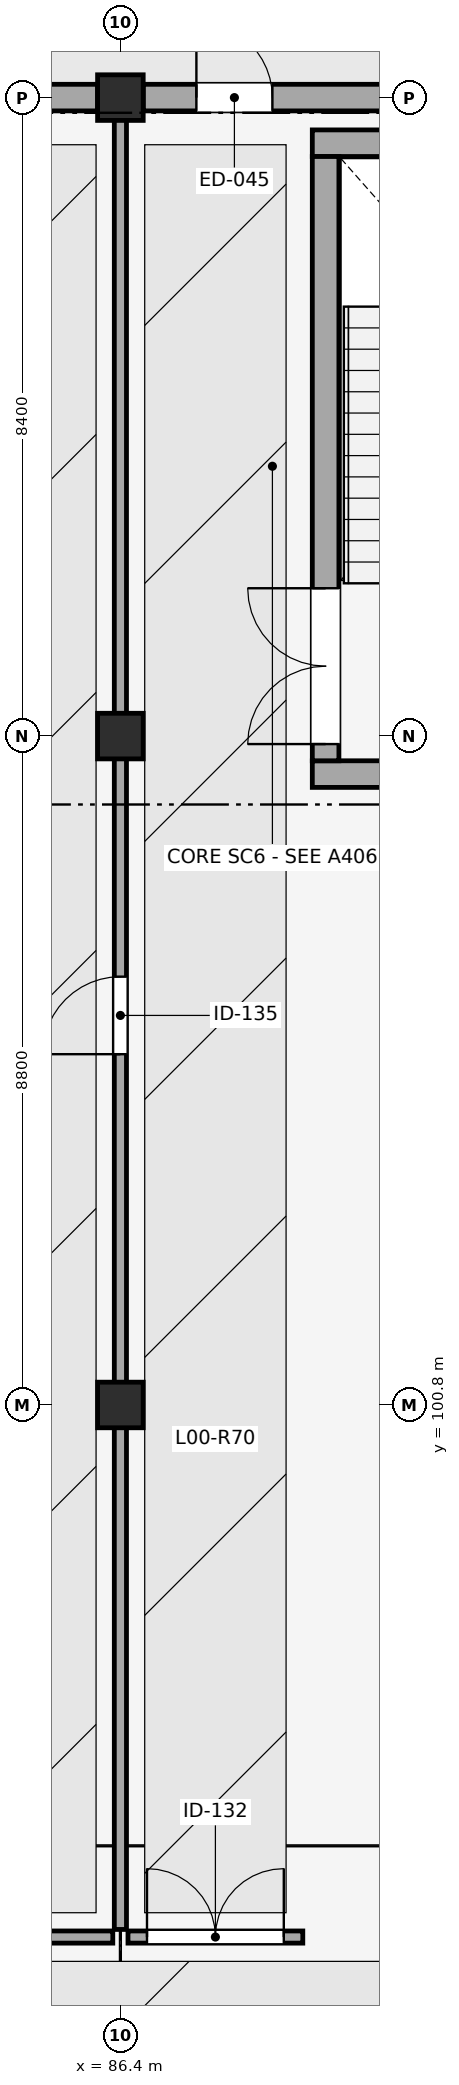
"""IFC4 building model, lengths in metres.
Left out: names, types, materials, properties, quantities, classifications, styles, units other than length and angle.
Written with IfcOpenShell. Run it as: python <this file> out.ifc"""

import sys

from ifc_helpers import new_model, si_unit, direction, frame, frame_2d, origin, origin_2d, place, context, subcontext, project, spatial, rectangle, extrude, element, fill, save


model = new_model("IFC4")
c1 = context("Model", 3, precision=1e-05, world=origin(), true_north=direction((0.0, 1.0)))
c2 = subcontext(c1, "Body", "Model", "MODEL_VIEW")
j1 = project(units=[si_unit("LENGTHUNIT", "METRE"), si_unit("PLANEANGLEUNIT", "RADIAN")], contexts=[c1])
p1 = place(None, origin())
s1 = spatial("IfcSite", under=j1, at=p1, CompositionType="ELEMENT")
p2 = place(p1, origin())
s2 = spatial("IfcBuilding", under=s1, at=p2, CompositionType="ELEMENT")
p3 = place(p2, origin())
s3 = spatial("IfcBuildingStorey", under=s2, at=p3, CompositionType="ELEMENT", Elevation=0.0)
for number, where, z_axis, x_axis in (
    (1, (86.4, 100.8, 0.0), (0.0, 0.0, 1.0), (1.0, 0.0, 0.0)),
    (2, (86.4, 109.6, 0.0), (0.0, 0.0, 1.0), (1.0, 0.0, 0.0)),
    (3, (86.4, 118.0, 0.0), (0.0, 0.0, 1.0), (1.0, 0.0, 0.0)),
):
    element("IfcColumn", number, at=place(p3, frame(where, z_axis=z_axis, x_axis=x_axis)), inside=s3, PredefinedType="COLUMN", context=c2, shape_type="SweptSolid", body=[
        extrude(rectangle(XDim=0.6, YDim=0.6, at=origin_2d()), origin(), (0.0, 0.0, 1.0), 4.8),
    ])
p4 = place(p3, frame((77.1, 118.0, 0.0), z_axis=(0.0, 0.0, 1.0), x_axis=(1.0, 0.0, 0.0)))
e4 = element("IfcWall", 4, at=p4, inside=s3, PredefinedType="SOLIDWALL", context=c2, shape_type="SweptSolid", body=[
    extrude(rectangle(XDim=9.0, YDim=0.35, at=frame_2d((4.5, 0.0))), origin(), (0.0, 0.0, 1.0), 4.1),
])
p5 = place(p4, frame((5.4, 0.0, 1.1)))
e5 = element("IfcOpeningElement", 5, at=p5, cuts=e4, PredefinedType="OPENING", context=c2, shape_type="SweptSolid", body=[
    extrude(rectangle(XDim=1.42, YDim=1.54, at=frame_2d((0.71, 0.77))), frame((0.0, 0.185, 0.0), z_axis=(0.0, -1.0, 0.0), x_axis=(1.0, 0.0, 0.0)), (0.0, 0.0, 1.0), 0.37),
])
p6 = place(p3, frame((86.7, 118.0, 0.0), z_axis=(0.0, 0.0, 1.0), x_axis=(1.0, 0.0, 0.0)))
e6 = element("IfcWall", 6, at=p6, inside=s3, PredefinedType="SOLIDWALL", context=c2, shape_type="SweptSolid", body=[
    extrude(rectangle(XDim=9.0, YDim=0.35, at=frame_2d((4.5, 0.0))), origin(), (0.0, 0.0, 1.0), 4.1),
])
p7 = place(p6, frame((0.7, 0.0, 0.0)))
e7 = element("IfcOpeningElement", 7, at=p7, cuts=e6, PredefinedType="OPENING", context=c2, shape_type="SweptSolid", body=[
    extrude(rectangle(XDim=1.0, YDim=2.2, at=frame_2d((0.5, 1.1))), frame((0.0, 0.185, 0.0), z_axis=(0.0, -1.0, 0.0), x_axis=(1.0, 0.0, 0.0)), (0.0, 0.0, 1.0), 0.37),
])
p8 = place(p6, frame((5.4, 0.0, 1.1)))
e8 = element("IfcOpeningElement", 8, at=p8, cuts=e6, PredefinedType="OPENING", context=c2, shape_type="SweptSolid", body=[
    extrude(rectangle(XDim=1.5, YDim=1.6, at=frame_2d((0.75, 0.8))), frame((0.0, 0.185, 0.0), z_axis=(0.0, -1.0, 0.0), x_axis=(1.0, 0.0, 0.0)), (0.0, 0.0, 1.0), 0.37),
])
for number, where, z_axis, x_axis in (
    (9, (94.575, 109.1, 0.0), (0.0, 0.0, 1.0), (-1.0, 0.0, 0.0)),
    (10, (88.925, 117.4, 0.0), (0.0, 0.0, 1.0), (1.0, 0.0, 0.0)),
):
    element("IfcWall", number, at=place(p3, frame(where, z_axis=z_axis, x_axis=x_axis)), inside=s3, PredefinedType="SHEAR", context=c2, shape_type="SweptSolid", body=[
        extrude(rectangle(XDim=5.65, YDim=0.35, at=frame_2d((2.825, 0.0))), origin(), (0.0, 0.0, 1.0), 4.55),
    ])
p9 = place(p3, frame((89.1, 109.275, 0.0), z_axis=(0.0, 0.0, 1.0), x_axis=(0.0, 1.0, 0.0)))
e11 = element("IfcWall", 11, at=p9, inside=s3, PredefinedType="SHEAR", context=c2, shape_type="SweptSolid", body=[
    extrude(rectangle(XDim=7.95, YDim=0.35, at=frame_2d((3.975, 0.0))), origin(), (0.0, 0.0, 1.0), 4.55),
])
p10 = place(p9, frame((0.22, 0.0, 0.0)))
e12 = element("IfcOpeningElement", 12, at=p10, cuts=e11, PredefinedType="OPENING", context=c2, shape_type="SweptSolid", body=[
    extrude(rectangle(XDim=2.05, YDim=2.15, at=frame_2d((1.025, 1.075))), frame((0.0, 0.185, 0.0), z_axis=(0.0, -1.0, 0.0), x_axis=(1.0, 0.0, 0.0)), (0.0, 0.0, 1.0), 0.37),
])
p11 = place(p3, frame((86.5, 93.8, 0.0), z_axis=(0.0, 0.0, 1.0), x_axis=(1.0, 0.0, 0.0)))
e13 = element("IfcWall", 13, at=p11, inside=s3, PredefinedType="PARTITIONING", context=c2, shape_type="SweptSolid", body=[
    extrude(rectangle(XDim=2.3, YDim=0.16, at=frame_2d((1.15, 0.0))), origin(), (0.0, 0.0, 1.0), 4.42),
])
p12 = place(p11, frame((0.25, 0.0, 0.0)))
e14 = element("IfcOpeningElement", 14, at=p12, cuts=e13, PredefinedType="OPENING", context=c2, shape_type="SweptSolid", body=[
    extrude(rectangle(XDim=1.8, YDim=2.15, at=frame_2d((0.9, 1.075))), frame((0.0, 0.09, 0.0), z_axis=(0.0, -1.0, 0.0), x_axis=(1.0, 0.0, 0.0)), (0.0, 0.0, 1.0), 0.18),
])
p13 = place(p3, frame((48.05, 93.8, 0.0), z_axis=(0.0, 0.0, 1.0), x_axis=(1.0, 0.0, 0.0)))
e15 = element("IfcWall", 15, at=p13, inside=s3, PredefinedType="PARTITIONING", context=c2, shape_type="SweptSolid", body=[
    extrude(rectangle(XDim=38.25, YDim=0.16, at=frame_2d((19.125, 0.0))), origin(), (0.0, 0.0, 1.0), 4.42),
])
p14 = place(p13, frame((18.615, 0.0, 0.0)))
e16 = element("IfcOpeningElement", 16, at=p14, cuts=e15, PredefinedType="OPENING", context=c2, shape_type="SweptSolid", body=[
    extrude(rectangle(XDim=1.02, YDim=2.16, at=frame_2d((0.51, 1.08))), frame((0.0, 0.09, 0.0), z_axis=(0.0, -1.0, 0.0), x_axis=(1.0, 0.0, 0.0)), (0.0, 0.0, 1.0), 0.18),
])
p15 = place(p3, frame((86.4, 93.9, 0.0), z_axis=(0.0, 0.0, 1.0), x_axis=(0.0, 1.0, 0.0)))
e17 = element("IfcWall", 17, at=p15, inside=s3, PredefinedType="PARTITIONING", context=c2, shape_type="SweptSolid", body=[
    extrude(rectangle(XDim=24.05, YDim=0.16, at=frame_2d((12.025, 0.0))), origin(), (0.0, 0.0, 1.0), 3.92),
])
p16 = place(p15, frame((11.515, 0.0, 0.0)))
e18 = element("IfcOpeningElement", 18, at=p16, cuts=e17, PredefinedType="OPENING", context=c2, shape_type="SweptSolid", body=[
    extrude(rectangle(XDim=1.02, YDim=2.16, at=frame_2d((0.51, 1.08))), frame((0.0, 0.09, 0.0), z_axis=(0.0, -1.0, 0.0), x_axis=(1.0, 0.0, 0.0)), (0.0, 0.0, 1.0), 0.18),
])
p17 = place(p7, origin())
e19 = element("IfcDoor", 19, at=p17, inside=s3, OperationType="SINGLE_SWING_LEFT", PredefinedType="DOOR", context=c2, shape_type="SweptSolid", body=[
    extrude(rectangle(XDim=1.0, YDim=2.2, at=frame_2d((0.5, 1.1))), frame((0.0, 0.025, 0.0), z_axis=(0.0, -1.0, 0.0), x_axis=(1.0, 0.0, 0.0)), (0.0, 0.0, 1.0), 0.05),
])
fill(e7, e19)
p18 = place(p10, origin())
e20 = element("IfcDoor", 20, at=p18, inside=s3, OperationType="DOUBLE_DOOR_SINGLE_SWING", PredefinedType="DOOR", context=c2, shape_type="SweptSolid", body=[
    extrude(rectangle(XDim=2.05, YDim=2.15, at=frame_2d((1.025, 1.075))), frame((0.0, 0.025, 0.0), z_axis=(0.0, -1.0, 0.0), x_axis=(1.0, 0.0, 0.0)), (0.0, 0.0, 1.0), 0.05),
])
fill(e12, e20)
p19 = place(p12, origin())
e21 = element("IfcDoor", 21, at=p19, inside=s3, OperationType="DOUBLE_DOOR_SINGLE_SWING", PredefinedType="DOOR", context=c2, shape_type="SweptSolid", body=[
    extrude(rectangle(XDim=1.8, YDim=2.15, at=frame_2d((0.9, 1.075))), frame((0.0, 0.025, 0.0), z_axis=(0.0, -1.0, 0.0), x_axis=(1.0, 0.0, 0.0)), (0.0, 0.0, 1.0), 0.05),
])
fill(e14, e21)
p20 = place(p16, origin())
e22 = element("IfcDoor", 22, at=p20, inside=s3, OperationType="SINGLE_SWING_LEFT", PredefinedType="DOOR", context=c2, shape_type="SweptSolid", body=[
    extrude(rectangle(XDim=1.02, YDim=2.16, at=frame_2d((0.51, 1.08))), frame((0.0, 0.025, 0.0), z_axis=(0.0, -1.0, 0.0), x_axis=(1.0, 0.0, 0.0)), (0.0, 0.0, 1.0), 0.05),
])
fill(e18, e22)
save(model, sys.argv[1])
